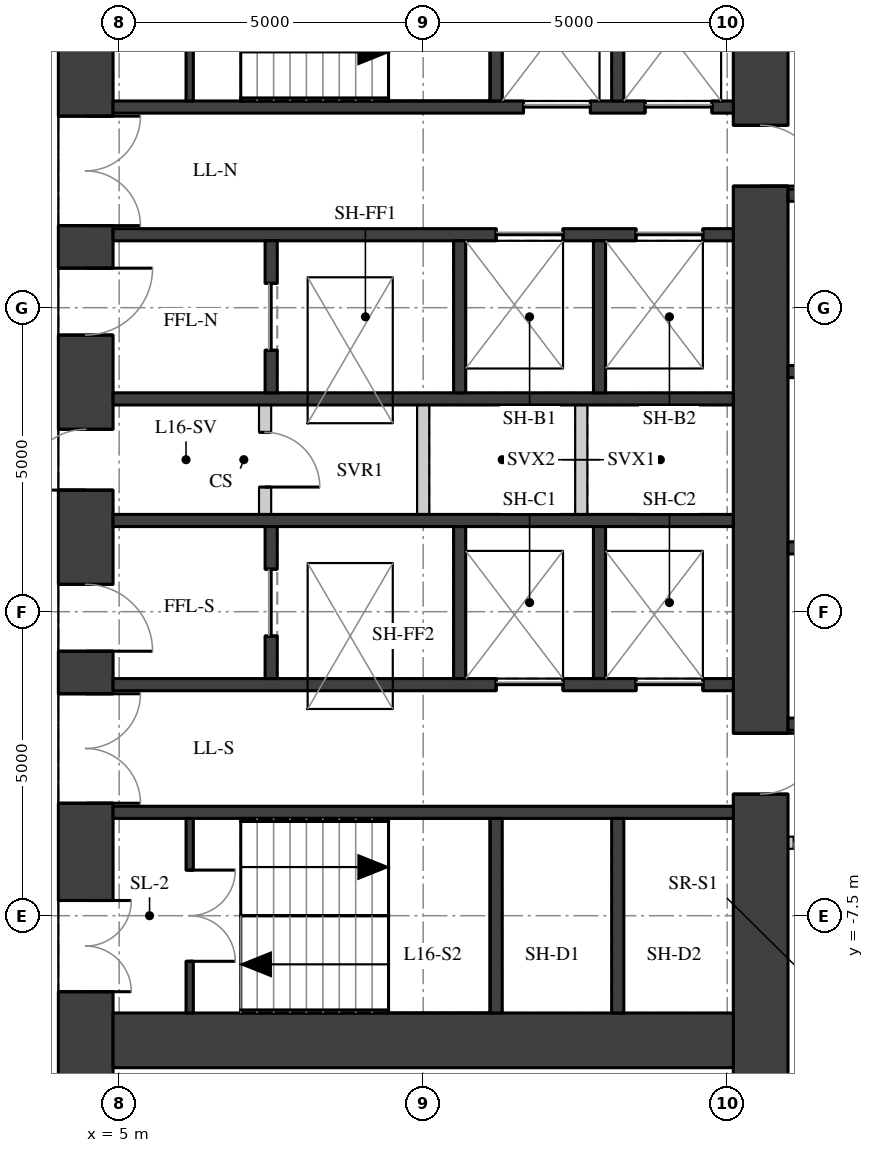
"""IFC4 building model, lengths in metres.
Left out: names, types, materials, properties, quantities, classifications, styles, units other than length and angle.
Written with IfcOpenShell. Run it as: python <this file> out.ifc"""

import sys

from ifc_helpers import new_model, si_unit, direction, frame, frame_2d, origin, place, context, subcontext, project, spatial, rectangle, extrude, element, fill, save


model = new_model("IFC4")
c1 = context("Model", 3, precision=1e-05, world=origin(), true_north=direction((0.0, 1.0)))
c2 = subcontext(c1, "Body", "Model", "MODEL_VIEW")
j1 = project(units=[si_unit("LENGTHUNIT", "METRE"), si_unit("PLANEANGLEUNIT", "RADIAN")], contexts=[c1])
p1 = place(None, origin())
s1 = spatial("IfcSite", under=j1, at=p1, CompositionType="ELEMENT")
p2 = place(p1, origin())
s2 = spatial("IfcBuilding", under=s1, at=p2, CompositionType="ELEMENT")
p3 = place(p2, frame((0.0, 0.0, 61.3)))
s3 = spatial("IfcBuildingStorey", under=s2, at=p3, CompositionType="ELEMENT", Elevation=61.3)
p4 = place(p3, frame((4.45, -11.1, 0.0), z_axis=(0.0, 0.0, 1.0), x_axis=(0.0, 1.0, 0.0)))
e1 = element("IfcWall", 1, at=p4, inside=s3, PredefinedType="SHEAR", context=c2, shape_type="SweptSolid", body=[
    extrude(rectangle(XDim=22.2, YDim=0.9, at=frame_2d((11.1, 0.0))), origin(), (0.0, 0.0, 1.0), 3.02),
])
p5 = place(p4, frame((2.35, 0.0, 0.0)))
e2 = element("IfcOpeningElement", 2, at=p5, cuts=e1, PredefinedType="OPENING", context=c2, shape_type="SweptSolid", body=[
    extrude(rectangle(XDim=1.5, YDim=2.1, at=frame_2d((0.75, 1.05))), frame((0.0, 0.46, 0.0), z_axis=(0.0, -1.0, 0.0), x_axis=(1.0, 0.0, 0.0)), (0.0, 0.0, 1.0), 0.92),
])
p6 = place(p4, frame((5.45, 0.0, 0.0)))
e3 = element("IfcOpeningElement", 3, at=p6, cuts=e1, PredefinedType="OPENING", context=c2, shape_type="SweptSolid", body=[
    extrude(rectangle(XDim=1.8, YDim=2.1, at=frame_2d((0.9, 1.05))), frame((0.0, 0.46, 0.0), z_axis=(0.0, -1.0, 0.0), x_axis=(1.0, 0.0, 0.0)), (0.0, 0.0, 1.0), 0.92),
])
p7 = place(p4, frame((7.95, 0.0, 0.0)))
e4 = element("IfcOpeningElement", 4, at=p7, cuts=e1, PredefinedType="OPENING", context=c2, shape_type="SweptSolid", body=[
    extrude(rectangle(XDim=1.1, YDim=2.1, at=frame_2d((0.55, 1.05))), frame((0.0, 0.46, 0.0), z_axis=(0.0, -1.0, 0.0), x_axis=(1.0, 0.0, 0.0)), (0.0, 0.0, 1.0), 0.92),
])
p8 = place(p4, frame((10.6, 0.0, 0.0)))
e5 = element("IfcOpeningElement", 5, at=p8, cuts=e1, PredefinedType="OPENING", context=c2, shape_type="SweptSolid", body=[
    extrude(rectangle(XDim=1.0, YDim=2.1, at=frame_2d((0.5, 1.05))), frame((0.0, 0.46, 0.0), z_axis=(0.0, -1.0, 0.0), x_axis=(1.0, 0.0, 0.0)), (0.0, 0.0, 1.0), 0.92),
])
p9 = place(p4, frame((13.15, 0.0, 0.0)))
e6 = element("IfcOpeningElement", 6, at=p9, cuts=e1, PredefinedType="OPENING", context=c2, shape_type="SweptSolid", body=[
    extrude(rectangle(XDim=1.1, YDim=2.1, at=frame_2d((0.55, 1.05))), frame((0.0, 0.46, 0.0), z_axis=(0.0, -1.0, 0.0), x_axis=(1.0, 0.0, 0.0)), (0.0, 0.0, 1.0), 0.92),
])
p10 = place(p4, frame((14.95, 0.0, 0.0)))
e7 = element("IfcOpeningElement", 7, at=p10, cuts=e1, PredefinedType="OPENING", context=c2, shape_type="SweptSolid", body=[
    extrude(rectangle(XDim=1.8, YDim=2.1, at=frame_2d((0.9, 1.05))), frame((0.0, 0.46, 0.0), z_axis=(0.0, -1.0, 0.0), x_axis=(1.0, 0.0, 0.0)), (0.0, 0.0, 1.0), 0.92),
])
p11 = place(p4, frame((18.35, 0.0, 0.0)))
e8 = element("IfcOpeningElement", 8, at=p11, cuts=e1, PredefinedType="OPENING", context=c2, shape_type="SweptSolid", body=[
    extrude(rectangle(XDim=1.5, YDim=2.1, at=frame_2d((0.75, 1.05))), frame((0.0, 0.46, 0.0), z_axis=(0.0, -1.0, 0.0), x_axis=(1.0, 0.0, 0.0)), (0.0, 0.0, 1.0), 0.92),
])
p12 = place(p3, frame((15.55, -11.1, 0.0), z_axis=(0.0, 0.0, 1.0), x_axis=(0.0, 1.0, 0.0)))
e9 = element("IfcWall", 9, at=p12, inside=s3, PredefinedType="SHEAR", context=c2, shape_type="SweptSolid", body=[
    extrude(rectangle(XDim=22.2, YDim=0.9, at=frame_2d((11.1, 0.0))), origin(), (0.0, 0.0, 1.0), 3.02),
])
p13 = place(p12, frame((15.6, 0.0, 0.0)))
e10 = element("IfcOpeningElement", 10, at=p13, cuts=e9, PredefinedType="OPENING", context=c2, shape_type="SweptSolid", body=[
    extrude(rectangle(XDim=1.0, YDim=2.1, at=frame_2d((0.5, 1.05))), frame((0.0, 0.46, 0.0), z_axis=(0.0, -1.0, 0.0), x_axis=(1.0, 0.0, 0.0)), (0.0, 0.0, 1.0), 0.92),
])
p14 = place(p12, frame((5.6, 0.0, 0.0)))
e11 = element("IfcOpeningElement", 11, at=p14, cuts=e9, PredefinedType="OPENING", context=c2, shape_type="SweptSolid", body=[
    extrude(rectangle(XDim=1.0, YDim=2.1, at=frame_2d((0.5, 1.05))), frame((0.0, 0.46, 0.0), z_axis=(0.0, -1.0, 0.0), x_axis=(1.0, 0.0, 0.0)), (0.0, 0.0, 1.0), 0.92),
])
p15 = place(p3, frame((4.9, -9.55, 0.0), z_axis=(0.0, 0.0, 1.0), x_axis=(1.0, 0.0, 0.0)))
e12 = element("IfcWall", 12, at=p15, inside=s3, PredefinedType="SHEAR", context=c2, shape_type="SweptSolid", body=[
    extrude(rectangle(XDim=10.2, YDim=0.9, at=frame_2d((5.1, 0.0))), origin(), (0.0, 0.0, 1.0), 3.02),
])
p16 = place(p3, frame((4.9, 5.8, 0.0), z_axis=(0.0, 0.0, 1.0), x_axis=(1.0, 0.0, 0.0)))
e13 = element("IfcWall", 13, at=p16, inside=s3, PredefinedType="SHEAR", context=c2, shape_type="SweptSolid", body=[
    extrude(rectangle(XDim=10.2, YDim=0.2, at=frame_2d((5.1, 0.0))), origin(), (0.0, 0.0, 1.0), 3.02),
])
p17 = place(p16, frame((6.75, 0.0, 0.0)))
e14 = element("IfcOpeningElement", 14, at=p17, cuts=e13, PredefinedType="OPENING", context=c2, shape_type="SweptSolid", body=[
    extrude(rectangle(XDim=1.1, YDim=2.1, at=frame_2d((0.55, 1.05))), frame((0.0, 0.11, 0.0), z_axis=(0.0, -1.0, 0.0), x_axis=(1.0, 0.0, 0.0)), (0.0, 0.0, 1.0), 0.22),
])
p18 = place(p16, frame((8.75, 0.0, 0.0)))
e15 = element("IfcOpeningElement", 15, at=p18, cuts=e13, PredefinedType="OPENING", context=c2, shape_type="SweptSolid", body=[
    extrude(rectangle(XDim=1.1, YDim=2.1, at=frame_2d((0.55, 1.05))), frame((0.0, 0.11, 0.0), z_axis=(0.0, -1.0, 0.0), x_axis=(1.0, 0.0, 0.0)), (0.0, 0.0, 1.0), 0.22),
])
p19 = place(p3, frame((4.9, 3.7, 0.0), z_axis=(0.0, 0.0, 1.0), x_axis=(1.0, 0.0, 0.0)))
e16 = element("IfcWall", 16, at=p19, inside=s3, PredefinedType="SHEAR", context=c2, shape_type="SweptSolid", body=[
    extrude(rectangle(XDim=10.2, YDim=0.2, at=frame_2d((5.1, 0.0))), origin(), (0.0, 0.0, 1.0), 3.02),
])
p20 = place(p19, frame((6.3, 0.0, 0.0)))
e17 = element("IfcOpeningElement", 17, at=p20, cuts=e16, PredefinedType="OPENING", context=c2, shape_type="SweptSolid", body=[
    extrude(rectangle(XDim=1.1, YDim=2.1, at=frame_2d((0.55, 1.05))), frame((0.0, 0.11, 0.0), z_axis=(0.0, -1.0, 0.0), x_axis=(1.0, 0.0, 0.0)), (0.0, 0.0, 1.0), 0.22),
])
p21 = place(p19, frame((8.6, 0.0, 0.0)))
e18 = element("IfcOpeningElement", 18, at=p21, cuts=e16, PredefinedType="OPENING", context=c2, shape_type="SweptSolid", body=[
    extrude(rectangle(XDim=1.1, YDim=2.1, at=frame_2d((0.55, 1.05))), frame((0.0, 0.11, 0.0), z_axis=(0.0, -1.0, 0.0), x_axis=(1.0, 0.0, 0.0)), (0.0, 0.0, 1.0), 0.22),
])
for number, where, z_axis, x_axis in (
    (19, (4.9, 1.0, 0.0), (0.0, 0.0, 1.0), (1.0, 0.0, 0.0)),
    (20, (4.9, -1.0, 0.0), (0.0, 0.0, 1.0), (1.0, 0.0, 0.0)),
):
    element("IfcWall", number, at=place(p3, frame(where, z_axis=z_axis, x_axis=x_axis)), inside=s3, PredefinedType="SHEAR", context=c2, shape_type="SweptSolid", body=[
        extrude(rectangle(XDim=10.2, YDim=0.2, at=frame_2d((5.1, 0.0))), origin(), (0.0, 0.0, 1.0), 3.02),
    ])
p22 = place(p3, frame((4.9, -3.7, 0.0), z_axis=(0.0, 0.0, 1.0), x_axis=(1.0, 0.0, 0.0)))
e21 = element("IfcWall", 21, at=p22, inside=s3, PredefinedType="SHEAR", context=c2, shape_type="SweptSolid", body=[
    extrude(rectangle(XDim=10.2, YDim=0.2, at=frame_2d((5.1, 0.0))), origin(), (0.0, 0.0, 1.0), 3.02),
])
p23 = place(p22, frame((6.3, 0.0, 0.0)))
e22 = element("IfcOpeningElement", 22, at=p23, cuts=e21, PredefinedType="OPENING", context=c2, shape_type="SweptSolid", body=[
    extrude(rectangle(XDim=1.1, YDim=2.1, at=frame_2d((0.55, 1.05))), frame((0.0, 0.11, 0.0), z_axis=(0.0, -1.0, 0.0), x_axis=(1.0, 0.0, 0.0)), (0.0, 0.0, 1.0), 0.22),
])
p24 = place(p22, frame((8.6, 0.0, 0.0)))
e23 = element("IfcOpeningElement", 23, at=p24, cuts=e21, PredefinedType="OPENING", context=c2, shape_type="SweptSolid", body=[
    extrude(rectangle(XDim=1.1, YDim=2.1, at=frame_2d((0.55, 1.05))), frame((0.0, 0.11, 0.0), z_axis=(0.0, -1.0, 0.0), x_axis=(1.0, 0.0, 0.0)), (0.0, 0.0, 1.0), 0.22),
])
p25 = place(p3, frame((4.9, -5.8, 0.0), z_axis=(0.0, 0.0, 1.0), x_axis=(1.0, 0.0, 0.0)))
e24 = element("IfcWall", 24, at=p25, inside=s3, PredefinedType="SHEAR", context=c2, shape_type="SweptSolid", body=[
    extrude(rectangle(XDim=10.2, YDim=0.2, at=frame_2d((5.1, 0.0))), origin(), (0.0, 0.0, 1.0), 3.02),
])
for number, where, z_axis, x_axis in (
    (25, (11.2, 5.9, 0.0), (0.0, 0.0, 1.0), (0.0, 1.0, 0.0)),
    (26, (11.2, -9.1, 0.0), (0.0, 0.0, 1.0), (0.0, 1.0, 0.0)),
    (27, (13.2, 5.9, 0.0), (0.0, 0.0, 1.0), (0.0, 1.0, 0.0)),
    (28, (13.2, -9.1, 0.0), (0.0, 0.0, 1.0), (0.0, 1.0, 0.0)),
):
    element("IfcWall", number, at=place(p3, frame(where, z_axis=z_axis, x_axis=x_axis)), inside=s3, PredefinedType="SHEAR", context=c2, shape_type="SweptSolid", body=[
        extrude(rectangle(XDim=3.2, YDim=0.2, at=frame_2d((1.6, 0.0))), origin(), (0.0, 0.0, 1.0), 3.02),
    ])
p26 = place(p3, frame((7.5, 1.1, 0.0), z_axis=(0.0, 0.0, 1.0), x_axis=(0.0, 1.0, 0.0)))
e29 = element("IfcWall", 29, at=p26, inside=s3, PredefinedType="SHEAR", context=c2, shape_type="SweptSolid", body=[
    extrude(rectangle(XDim=2.5, YDim=0.2, at=frame_2d((1.25, 0.0))), origin(), (0.0, 0.0, 1.0), 3.02),
])
p27 = place(p26, frame((0.7, 0.0, 0.0)))
e30 = element("IfcOpeningElement", 30, at=p27, cuts=e29, PredefinedType="OPENING", context=c2, shape_type="SweptSolid", body=[
    extrude(rectangle(XDim=1.1, YDim=2.1, at=frame_2d((0.55, 1.05))), frame((0.0, 0.11, 0.0), z_axis=(0.0, -1.0, 0.0), x_axis=(1.0, 0.0, 0.0)), (0.0, 0.0, 1.0), 0.22),
])
p28 = place(p3, frame((7.5, -3.6, 0.0), z_axis=(0.0, 0.0, 1.0), x_axis=(0.0, 1.0, 0.0)))
e31 = element("IfcWall", 31, at=p28, inside=s3, PredefinedType="SHEAR", context=c2, shape_type="SweptSolid", body=[
    extrude(rectangle(XDim=2.5, YDim=0.2, at=frame_2d((1.25, 0.0))), origin(), (0.0, 0.0, 1.0), 3.02),
])
p29 = place(p28, frame((0.7, 0.0, 0.0)))
e32 = element("IfcOpeningElement", 32, at=p29, cuts=e31, PredefinedType="OPENING", context=c2, shape_type="SweptSolid", body=[
    extrude(rectangle(XDim=1.1, YDim=2.1, at=frame_2d((0.55, 1.05))), frame((0.0, 0.11, 0.0), z_axis=(0.0, -1.0, 0.0), x_axis=(1.0, 0.0, 0.0)), (0.0, 0.0, 1.0), 0.22),
])
for number, where, z_axis, x_axis in (
    (33, (10.6, 1.1, 0.0), (0.0, 0.0, 1.0), (0.0, 1.0, 0.0)),
    (34, (10.6, -3.6, 0.0), (0.0, 0.0, 1.0), (0.0, 1.0, 0.0)),
    (35, (12.9, 1.1, 0.0), (0.0, 0.0, 1.0), (0.0, 1.0, 0.0)),
    (36, (12.9, -3.6, 0.0), (0.0, 0.0, 1.0), (0.0, 1.0, 0.0)),
):
    element("IfcWall", number, at=place(p3, frame(where, z_axis=z_axis, x_axis=x_axis)), inside=s3, PredefinedType="SHEAR", context=c2, shape_type="SweptSolid", body=[
        extrude(rectangle(XDim=2.5, YDim=0.2, at=frame_2d((1.25, 0.0))), origin(), (0.0, 0.0, 1.0), 3.02),
    ])
p30 = place(p3, frame((6.16, 5.9, 0.0), z_axis=(0.0, 0.0, 1.0), x_axis=(0.0, 1.0, 0.0)))
e37 = element("IfcWall", 37, at=p30, inside=s3, PredefinedType="SHEAR", context=c2, shape_type="SweptSolid", body=[
    extrude(rectangle(XDim=3.2, YDim=0.12, at=frame_2d((1.6, 0.0))), origin(), (0.0, 0.0, 1.0), 3.02),
])
p31 = place(p30, frame((0.85, 0.0, 0.0)))
e38 = element("IfcOpeningElement", 38, at=p31, cuts=e37, PredefinedType="OPENING", context=c2, shape_type="SweptSolid", body=[
    extrude(rectangle(XDim=1.5, YDim=2.1, at=frame_2d((0.75, 1.05))), frame((0.0, 0.07, 0.0), z_axis=(0.0, -1.0, 0.0), x_axis=(1.0, 0.0, 0.0)), (0.0, 0.0, 1.0), 0.14),
])
p32 = place(p3, frame((6.16, -9.1, 0.0), z_axis=(0.0, 0.0, 1.0), x_axis=(0.0, 1.0, 0.0)))
e39 = element("IfcWall", 39, at=p32, inside=s3, PredefinedType="SHEAR", context=c2, shape_type="SweptSolid", body=[
    extrude(rectangle(XDim=3.2, YDim=0.12, at=frame_2d((1.6, 0.0))), origin(), (0.0, 0.0, 1.0), 3.02),
])
p33 = place(p32, frame((0.85, 0.0, 0.0)))
e40 = element("IfcOpeningElement", 40, at=p33, cuts=e39, PredefinedType="OPENING", context=c2, shape_type="SweptSolid", body=[
    extrude(rectangle(XDim=1.5, YDim=2.1, at=frame_2d((0.75, 1.05))), frame((0.0, 0.07, 0.0), z_axis=(0.0, -1.0, 0.0), x_axis=(1.0, 0.0, 0.0)), (0.0, 0.0, 1.0), 0.14),
])
p34 = place(p3, frame((7.4, -0.9, 0.0), z_axis=(0.0, 0.0, 1.0), x_axis=(0.0, 1.0, 0.0)))
e41 = element("IfcWall", 41, at=p34, inside=s3, PredefinedType="PARTITIONING", context=c2, shape_type="SweptSolid", body=[
    extrude(rectangle(XDim=1.8, YDim=0.2, at=frame_2d((0.9, 0.0))), origin(), (0.0, 0.0, 1.0), 3.02),
])
p35 = place(p34, frame((0.45, 0.0, 0.0)))
e42 = element("IfcOpeningElement", 42, at=p35, cuts=e41, PredefinedType="OPENING", context=c2, shape_type="SweptSolid", body=[
    extrude(rectangle(XDim=0.9, YDim=2.1, at=frame_2d((0.45, 1.05))), frame((0.0, 0.11, 0.0), z_axis=(0.0, -1.0, 0.0), x_axis=(1.0, 0.0, 0.0)), (0.0, 0.0, 1.0), 0.22),
])
for number, where, z_axis, x_axis in (
    (43, (10.0, -0.9, 0.0), (0.0, 0.0, 1.0), (0.0, 1.0, 0.0)),
    (44, (12.6, -0.9, 0.0), (0.0, 0.0, 1.0), (0.0, 1.0, 0.0)),
):
    element("IfcWall", number, at=place(p3, frame(where, z_axis=z_axis, x_axis=x_axis)), inside=s3, PredefinedType="PARTITIONING", context=c2, shape_type="SweptSolid", body=[
        extrude(rectangle(XDim=1.8, YDim=0.2, at=frame_2d((0.9, 0.0))), origin(), (0.0, 0.0, 1.0), 3.02),
    ])
for number, where, z_axis, x_axis in (
    (45, (16.0, -4.35, 0.0), (0.0, 0.0, 1.0), (1.0, 0.0, 0.0)),
    (46, (16.0, -1.45, 0.0), (0.0, 0.0, 1.0), (1.0, 0.0, 0.0)),
    (47, (16.0, 1.45, 0.0), (0.0, 0.0, 1.0), (1.0, 0.0, 0.0)),
    (48, (16.0, 4.35, 0.0), (0.0, 0.0, 1.0), (1.0, 0.0, 0.0)),
):
    element("IfcWall", number, at=place(p3, frame(where, z_axis=z_axis, x_axis=x_axis)), inside=s3, PredefinedType="SHEAR", context=c2, shape_type="SweptSolid", body=[
        extrude(rectangle(XDim=2.3, YDim=0.2, at=frame_2d((1.15, 0.0))), origin(), (0.0, 0.0, 1.0), 3.02),
    ])
p36 = place(p3, frame((16.0, -6.3, 0.0), z_axis=(0.0, 0.0, 1.0), x_axis=(1.0, 0.0, 0.0)))
e49 = element("IfcWall", 49, at=p36, inside=s3, PredefinedType="PARTITIONING", context=c2, shape_type="SweptSolid", body=[
    extrude(rectangle(XDim=2.3, YDim=0.2, at=frame_2d((1.15, 0.0))), origin(), (0.0, 0.0, 1.0), 3.02),
])
p37 = place(p36, frame((0.1, 0.0, 0.0)))
e50 = element("IfcOpeningElement", 50, at=p37, cuts=e49, PredefinedType="OPENING", context=c2, shape_type="SweptSolid", body=[
    extrude(rectangle(XDim=0.9, YDim=2.1, at=frame_2d((0.45, 1.05))), frame((0.0, 0.11, 0.0), z_axis=(0.0, -1.0, 0.0), x_axis=(1.0, 0.0, 0.0)), (0.0, 0.0, 1.0), 0.22),
])
p38 = place(p5, origin())
e51 = element("IfcDoor", 51, at=p38, inside=s3, OperationType="DOUBLE_DOOR_SINGLE_SWING", PredefinedType="DOOR", context=c2, shape_type="SweptSolid", body=[
    extrude(rectangle(XDim=1.5, YDim=2.1, at=frame_2d((0.75, 1.05))), frame((0.0, 0.025, 0.0), z_axis=(0.0, -1.0, 0.0), x_axis=(1.0, 0.0, 0.0)), (0.0, 0.0, 1.0), 0.05),
])
fill(e2, e51)
p39 = place(p6, origin())
e52 = element("IfcDoor", 52, at=p39, inside=s3, OperationType="DOUBLE_DOOR_SINGLE_SWING", PredefinedType="DOOR", context=c2, shape_type="SweptSolid", body=[
    extrude(rectangle(XDim=1.8, YDim=2.1, at=frame_2d((0.9, 1.05))), frame((0.0, 0.025, 0.0), z_axis=(0.0, -1.0, 0.0), x_axis=(1.0, 0.0, 0.0)), (0.0, 0.0, 1.0), 0.05),
])
fill(e3, e52)
p40 = place(p7, origin())
e53 = element("IfcDoor", 53, at=p40, inside=s3, OperationType="SINGLE_SWING_RIGHT", PredefinedType="DOOR", context=c2, shape_type="SweptSolid", body=[
    extrude(rectangle(XDim=1.1, YDim=2.1, at=frame_2d((0.55, 1.05))), frame((0.0, 0.025, 0.0), z_axis=(0.0, -1.0, 0.0), x_axis=(1.0, 0.0, 0.0)), (0.0, 0.0, 1.0), 0.05),
])
fill(e4, e53)
p41 = place(p8, origin())
e54 = element("IfcDoor", 54, at=p41, inside=s3, OperationType="SINGLE_SWING_LEFT", PredefinedType="DOOR", context=c2, shape_type="SweptSolid", body=[
    extrude(rectangle(XDim=1.0, YDim=2.1, at=frame_2d((0.5, 1.05))), frame((0.0, 0.025, 0.0), z_axis=(0.0, -1.0, 0.0), x_axis=(1.0, 0.0, 0.0)), (0.0, 0.0, 1.0), 0.05),
])
fill(e5, e54)
p42 = place(p9, origin())
e55 = element("IfcDoor", 55, at=p42, inside=s3, OperationType="SINGLE_SWING_LEFT", PredefinedType="DOOR", context=c2, shape_type="SweptSolid", body=[
    extrude(rectangle(XDim=1.1, YDim=2.1, at=frame_2d((0.55, 1.05))), frame((0.0, 0.025, 0.0), z_axis=(0.0, -1.0, 0.0), x_axis=(1.0, 0.0, 0.0)), (0.0, 0.0, 1.0), 0.05),
])
fill(e6, e55)
p43 = place(p10, origin())
e56 = element("IfcDoor", 56, at=p43, inside=s3, OperationType="DOUBLE_DOOR_SINGLE_SWING", PredefinedType="DOOR", context=c2, shape_type="SweptSolid", body=[
    extrude(rectangle(XDim=1.8, YDim=2.1, at=frame_2d((0.9, 1.05))), frame((0.0, 0.025, 0.0), z_axis=(0.0, -1.0, 0.0), x_axis=(1.0, 0.0, 0.0)), (0.0, 0.0, 1.0), 0.05),
])
fill(e7, e56)
p44 = place(p33, origin())
e57 = element("IfcDoor", 57, at=p44, inside=s3, OperationType="DOUBLE_DOOR_SINGLE_SWING", PredefinedType="DOOR", context=c2, shape_type="SweptSolid", body=[
    extrude(rectangle(XDim=1.5, YDim=2.1, at=frame_2d((0.75, 1.05))), frame((0.0, 0.025, 0.0), z_axis=(0.0, -1.0, 0.0), x_axis=(1.0, 0.0, 0.0)), (0.0, 0.0, 1.0), 0.05),
])
fill(e40, e57)
p45 = place(p17, origin())
e58 = element("IfcDoor", 58, at=p45, inside=s3, OperationType="DOUBLE_DOOR_SLIDING", PredefinedType="DOOR", context=c2, shape_type="SweptSolid", body=[
    extrude(rectangle(XDim=1.1, YDim=2.1, at=frame_2d((0.55, 1.05))), frame((0.0, 0.025, 0.0), z_axis=(0.0, -1.0, 0.0), x_axis=(1.0, 0.0, 0.0)), (0.0, 0.0, 1.0), 0.05),
])
fill(e14, e58)
p46 = place(p18, origin())
e59 = element("IfcDoor", 59, at=p46, inside=s3, OperationType="DOUBLE_DOOR_SLIDING", PredefinedType="DOOR", context=c2, shape_type="SweptSolid", body=[
    extrude(rectangle(XDim=1.1, YDim=2.1, at=frame_2d((0.55, 1.05))), frame((0.0, 0.025, 0.0), z_axis=(0.0, -1.0, 0.0), x_axis=(1.0, 0.0, 0.0)), (0.0, 0.0, 1.0), 0.05),
])
fill(e15, e59)
p47 = place(p20, origin())
e60 = element("IfcDoor", 60, at=p47, inside=s3, OperationType="DOUBLE_DOOR_SLIDING", PredefinedType="DOOR", context=c2, shape_type="SweptSolid", body=[
    extrude(rectangle(XDim=1.1, YDim=2.1, at=frame_2d((0.55, 1.05))), frame((0.0, 0.025, 0.0), z_axis=(0.0, -1.0, 0.0), x_axis=(1.0, 0.0, 0.0)), (0.0, 0.0, 1.0), 0.05),
])
fill(e17, e60)
p48 = place(p21, origin())
e61 = element("IfcDoor", 61, at=p48, inside=s3, OperationType="DOUBLE_DOOR_SLIDING", PredefinedType="DOOR", context=c2, shape_type="SweptSolid", body=[
    extrude(rectangle(XDim=1.1, YDim=2.1, at=frame_2d((0.55, 1.05))), frame((0.0, 0.025, 0.0), z_axis=(0.0, -1.0, 0.0), x_axis=(1.0, 0.0, 0.0)), (0.0, 0.0, 1.0), 0.05),
])
fill(e18, e61)
p49 = place(p23, origin())
e62 = element("IfcDoor", 62, at=p49, inside=s3, OperationType="DOUBLE_DOOR_SLIDING", PredefinedType="DOOR", context=c2, shape_type="SweptSolid", body=[
    extrude(rectangle(XDim=1.1, YDim=2.1, at=frame_2d((0.55, 1.05))), frame((0.0, 0.025, 0.0), z_axis=(0.0, -1.0, 0.0), x_axis=(1.0, 0.0, 0.0)), (0.0, 0.0, 1.0), 0.05),
])
fill(e22, e62)
p50 = place(p24, origin())
e63 = element("IfcDoor", 63, at=p50, inside=s3, OperationType="DOUBLE_DOOR_SLIDING", PredefinedType="DOOR", context=c2, shape_type="SweptSolid", body=[
    extrude(rectangle(XDim=1.1, YDim=2.1, at=frame_2d((0.55, 1.05))), frame((0.0, 0.025, 0.0), z_axis=(0.0, -1.0, 0.0), x_axis=(1.0, 0.0, 0.0)), (0.0, 0.0, 1.0), 0.05),
])
fill(e23, e63)
p51 = place(p27, origin())
e64 = element("IfcDoor", 64, at=p51, inside=s3, OperationType="DOUBLE_DOOR_SLIDING", PredefinedType="DOOR", context=c2, shape_type="SweptSolid", body=[
    extrude(rectangle(XDim=1.1, YDim=2.1, at=frame_2d((0.55, 1.05))), frame((0.0, 0.025, 0.0), z_axis=(0.0, -1.0, 0.0), x_axis=(1.0, 0.0, 0.0)), (0.0, 0.0, 1.0), 0.05),
])
fill(e30, e64)
p52 = place(p29, origin())
e65 = element("IfcDoor", 65, at=p52, inside=s3, OperationType="DOUBLE_DOOR_SLIDING", PredefinedType="DOOR", context=c2, shape_type="SweptSolid", body=[
    extrude(rectangle(XDim=1.1, YDim=2.1, at=frame_2d((0.55, 1.05))), frame((0.0, 0.025, 0.0), z_axis=(0.0, -1.0, 0.0), x_axis=(1.0, 0.0, 0.0)), (0.0, 0.0, 1.0), 0.05),
])
fill(e32, e65)
p53 = place(p35, origin())
e66 = element("IfcDoor", 66, at=p53, inside=s3, OperationType="SINGLE_SWING_RIGHT", PredefinedType="DOOR", context=c2, shape_type="SweptSolid", body=[
    extrude(rectangle(XDim=0.9, YDim=2.1, at=frame_2d((0.45, 1.05))), frame((0.0, 0.025, 0.0), z_axis=(0.0, -1.0, 0.0), x_axis=(1.0, 0.0, 0.0)), (0.0, 0.0, 1.0), 0.05),
])
fill(e42, e66)
p54 = place(p13, origin())
e67 = element("IfcDoor", 67, at=p54, inside=s3, OperationType="SINGLE_SWING_RIGHT", PredefinedType="DOOR", context=c2, shape_type="SweptSolid", body=[
    extrude(rectangle(XDim=1.0, YDim=2.1, at=frame_2d((0.5, 1.05))), frame((0.0, 0.025, 0.0), z_axis=(0.0, -1.0, 0.0), x_axis=(1.0, 0.0, 0.0)), (0.0, 0.0, 1.0), 0.05),
])
fill(e10, e67)
p55 = place(p14, origin())
e68 = element("IfcDoor", 68, at=p55, inside=s3, OperationType="SINGLE_SWING_LEFT", PredefinedType="DOOR", context=c2, shape_type="SweptSolid", body=[
    extrude(rectangle(XDim=1.0, YDim=2.1, at=frame_2d((0.5, 1.05))), frame((0.0, 0.025, 0.0), z_axis=(0.0, -1.0, 0.0), x_axis=(1.0, 0.0, 0.0)), (0.0, 0.0, 1.0), 0.05),
])
fill(e11, e68)
save(model, sys.argv[1])
